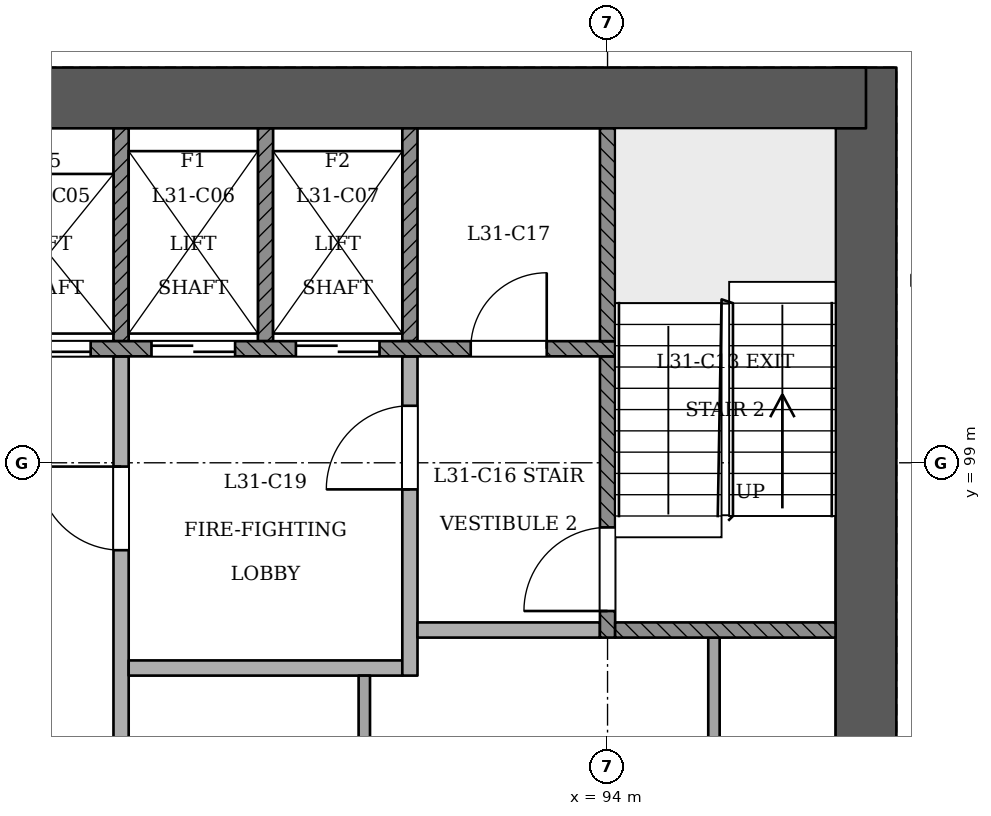
"""IFC4 building model, lengths in metres.
Left out: names, types, materials, properties, quantities, classifications, styles, units other than length and angle.
Written with IfcOpenShell. Run it as: python <this file> out.ifc"""

import sys

from ifc_helpers import new_model, si_unit, direction, frame, frame_2d, origin, place, context, subcontext, project, spatial, rectangle, extrude, element, fill, save


model = new_model("IFC4")
c1 = context("Model", 3, precision=1e-05, world=origin(), true_north=direction((0.0, 1.0)))
c2 = subcontext(c1, "Body", "Model", "MODEL_VIEW")
j1 = project(units=[si_unit("LENGTHUNIT", "METRE"), si_unit("PLANEANGLEUNIT", "RADIAN")], contexts=[c1])
p1 = place(None, origin())
s1 = spatial("IfcSite", under=j1, at=p1, CompositionType="ELEMENT")
p2 = place(p1, origin())
s2 = spatial("IfcBuilding", under=s1, at=p2, CompositionType="ELEMENT")
p3 = place(p2, frame((0.0, 0.0, 124.2)))
s3 = spatial("IfcBuildingStorey", under=s2, at=p3, CompositionType="ELEMENT", Elevation=124.2)
p4 = place(p3, frame((97.4, 93.0, 0.0), z_axis=(0.0, 0.0, 1.0), x_axis=(0.0, 1.0, 0.0)))
e1 = element("IfcWall", 1, at=p4, inside=s3, PredefinedType="SHEAR", context=c2, shape_type="SweptSolid", body=[
    extrude(rectangle(XDim=11.2, YDim=0.8, at=frame_2d((5.6, 0.0))), origin(), (0.0, 0.0, 1.0), 3.6),
])
p5 = place(p3, frame((97.4, 103.8, 0.0), z_axis=(0.0, 0.0, 1.0), x_axis=(-1.0, 0.0, 0.0)))
e2 = element("IfcWall", 2, at=p5, inside=s3, PredefinedType="SHEAR", context=c2, shape_type="SweptSolid", body=[
    extrude(rectangle(XDim=25.2, YDim=0.8, at=frame_2d((12.6, 0.0))), origin(), (0.0, 0.0, 1.0), 3.6),
])
p6 = place(p3, frame((85.208, 62.842, 0.0), z_axis=(0.0, 0.0, 1.0), x_axis=(0.499999338616, 0.866025785634, 0.0)))
e3 = element("IfcWall", 3, at=p6, inside=s3, PredefinedType="PARTITIONING", context=c2, shape_type="SweptSolid", body=[
    extrude(rectangle(XDim=40.758, YDim=0.15, at=frame_2d((20.379, 0.0))), origin(), (0.0, 0.0, 1.0), 2.75),
])
p7 = place(p6, frame((0.295, 0.0, 0.0)))
e4 = element("IfcOpeningElement", 4, at=p7, cuts=e3, PredefinedType="OPENING", context=c2, shape_type="SweptSolid", body=[
    extrude(rectangle(XDim=1.2, YDim=2.1, at=frame_2d((0.6, 1.05))), frame((0.0, 0.085, 0.0), z_axis=(0.0, -1.0, 0.0), x_axis=(1.0, 0.0, 0.0)), (0.0, 0.0, 1.0), 0.171),
])
p8 = place(p6, frame((4.129, 0.0, 0.0)))
e5 = element("IfcOpeningElement", 5, at=p8, cuts=e3, PredefinedType="OPENING", context=c2, shape_type="SweptSolid", body=[
    extrude(rectangle(XDim=1.0, YDim=2.1, at=frame_2d((0.5, 1.05))), frame((0.0, 0.085, 0.0), z_axis=(0.0, -1.0, 0.0), x_axis=(1.0, 0.0, 0.0)), (0.0, 0.0, 1.0), 0.171),
])
p9 = place(p6, frame((9.659, 0.0, 0.0)))
e6 = element("IfcOpeningElement", 6, at=p9, cuts=e3, PredefinedType="OPENING", context=c2, shape_type="SweptSolid", body=[
    extrude(rectangle(XDim=1.0, YDim=2.1, at=frame_2d((0.5, 1.05))), frame((0.0, 0.085, 0.0), z_axis=(0.0, -1.0, 0.0), x_axis=(1.0, 0.0, 0.0)), (0.0, 0.0, 1.0), 0.171),
])
p10 = place(p6, frame((11.984, 0.0, 0.0)))
e7 = element("IfcOpeningElement", 7, at=p10, cuts=e3, PredefinedType="OPENING", context=c2, shape_type="SweptSolid", body=[
    extrude(rectangle(XDim=1.0, YDim=2.1, at=frame_2d((0.5, 1.05))), frame((0.0, 0.085, 0.0), z_axis=(0.0, -1.0, 0.0), x_axis=(1.0, 0.0, 0.0)), (0.0, 0.0, 1.0), 0.171),
])
p11 = place(p6, frame((18.774, 0.0, 0.0)))
e8 = element("IfcOpeningElement", 8, at=p11, cuts=e3, PredefinedType="OPENING", context=c2, shape_type="SweptSolid", body=[
    extrude(rectangle(XDim=1.0, YDim=2.1, at=frame_2d((0.5, 1.05))), frame((0.0, 0.085, 0.0), z_axis=(0.0, -1.0, 0.0), x_axis=(1.0, 0.0, 0.0)), (0.0, 0.0, 1.0), 0.171),
])
p12 = place(p6, frame((21.099, 0.0, 0.0)))
e9 = element("IfcOpeningElement", 9, at=p12, cuts=e3, PredefinedType="OPENING", context=c2, shape_type="SweptSolid", body=[
    extrude(rectangle(XDim=1.0, YDim=2.1, at=frame_2d((0.5, 1.05))), frame((0.0, 0.085, 0.0), z_axis=(0.0, -1.0, 0.0), x_axis=(1.0, 0.0, 0.0)), (0.0, 0.0, 1.0), 0.171),
])
p13 = place(p6, frame((27.659, 0.0, 0.0)))
e10 = element("IfcOpeningElement", 10, at=p13, cuts=e3, PredefinedType="OPENING", context=c2, shape_type="SweptSolid", body=[
    extrude(rectangle(XDim=1.0, YDim=2.1, at=frame_2d((0.5, 1.05))), frame((0.0, 0.085, 0.0), z_axis=(0.0, -1.0, 0.0), x_axis=(1.0, 0.0, 0.0)), (0.0, 0.0, 1.0), 0.171),
])
p14 = place(p6, frame((30.099, 0.0, 0.0)))
e11 = element("IfcOpeningElement", 11, at=p14, cuts=e3, PredefinedType="OPENING", context=c2, shape_type="SweptSolid", body=[
    extrude(rectangle(XDim=1.0, YDim=2.1, at=frame_2d((0.5, 1.05))), frame((0.0, 0.085, 0.0), z_axis=(0.0, -1.0, 0.0), x_axis=(1.0, 0.0, 0.0)), (0.0, 0.0, 1.0), 0.171),
])
p15 = place(p6, frame((39.358, 0.0, 0.0)))
e12 = element("IfcOpeningElement", 12, at=p15, cuts=e3, PredefinedType="OPENING", context=c2, shape_type="SweptSolid", body=[
    extrude(rectangle(XDim=1.2, YDim=2.1, at=frame_2d((0.6, 1.05))), frame((0.0, 0.085, 0.0), z_axis=(0.0, -1.0, 0.0), x_axis=(1.0, 0.0, 0.0)), (0.0, 0.0, 1.0), 0.171),
])
p16 = place(p3, frame((87.6, 93.4, 0.0), z_axis=(0.0, 0.0, 1.0), x_axis=(0.0, 1.0, 0.0)))
e13 = element("IfcWall", 13, at=p16, inside=s3, PredefinedType="PARTITIONING", context=c2, shape_type="SweptSolid", body=[
    extrude(rectangle(XDim=7.0, YDim=0.2, at=frame_2d((3.5, 0.0))), origin(), (0.0, 0.0, 1.0), 3.15),
])
p17 = place(p16, frame((4.45, 0.0, 0.0)))
e14 = element("IfcOpeningElement", 14, at=p17, cuts=e13, PredefinedType="OPENING", context=c2, shape_type="SweptSolid", body=[
    extrude(rectangle(XDim=1.1, YDim=2.1, at=frame_2d((0.55, 1.05))), frame((0.0, 0.11, 0.0), z_axis=(0.0, -1.0, 0.0), x_axis=(1.0, 0.0, 0.0)), (0.0, 0.0, 1.0), 0.221),
])
p18 = place(p3, frame((90.8, 93.4, 0.0), z_axis=(0.0, 0.0, 1.0), x_axis=(0.0, 1.0, 0.0)))
e15 = element("IfcWall", 15, at=p18, inside=s3, PredefinedType="PARTITIONING", context=c2, shape_type="SweptSolid", body=[
    extrude(rectangle(XDim=2.8, YDim=0.15, at=frame_2d((1.4, 0.0))), origin(), (0.0, 0.0, 1.0), 3.15),
])
p19 = place(p3, frame((95.4, 93.4, 0.0), z_axis=(0.0, 0.0, 1.0), x_axis=(0.0, 1.0, 0.0)))
e16 = element("IfcWall", 16, at=p19, inside=s3, PredefinedType="PARTITIONING", context=c2, shape_type="SweptSolid", body=[
    extrude(rectangle(XDim=3.3, YDim=0.15, at=frame_2d((1.65, 0.0))), origin(), (0.0, 0.0, 1.0), 3.15),
])
p20 = place(p3, frame((87.7, 96.3, 0.0), z_axis=(0.0, 0.0, 1.0), x_axis=(1.0, 0.0, 0.0)))
e17 = element("IfcWall", 17, at=p20, inside=s3, PredefinedType="PARTITIONING", context=c2, shape_type="SweptSolid", body=[
    extrude(rectangle(XDim=3.6, YDim=0.2, at=frame_2d((1.8, 0.0))), origin(), (0.0, 0.0, 1.0), 3.15),
])
p21 = place(p3, frame((91.4, 96.2, 0.0), z_axis=(0.0, 0.0, 1.0), x_axis=(0.0, 1.0, 0.0)))
e18 = element("IfcWall", 18, at=p21, inside=s3, PredefinedType="PARTITIONING", context=c2, shape_type="SweptSolid", body=[
    extrude(rectangle(XDim=4.2, YDim=0.2, at=frame_2d((2.1, 0.0))), origin(), (0.0, 0.0, 1.0), 3.15),
])
p22 = place(p21, frame((2.45, 0.0, 0.0)))
e19 = element("IfcOpeningElement", 19, at=p22, cuts=e18, PredefinedType="OPENING", context=c2, shape_type="SweptSolid", body=[
    extrude(rectangle(XDim=1.1, YDim=2.1, at=frame_2d((0.55, 1.05))), frame((0.0, 0.11, 0.0), z_axis=(0.0, -1.0, 0.0), x_axis=(1.0, 0.0, 0.0)), (0.0, 0.0, 1.0), 0.221),
])
p23 = place(p3, frame((91.5, 96.8, 0.0), z_axis=(0.0, 0.0, 1.0), x_axis=(1.0, 0.0, 0.0)))
e20 = element("IfcWall", 20, at=p23, inside=s3, PredefinedType="PARTITIONING", context=c2, shape_type="SweptSolid", body=[
    extrude(rectangle(XDim=2.4, YDim=0.2, at=frame_2d((1.2, 0.0))), origin(), (0.0, 0.0, 1.0), 3.15),
])
p24 = place(p3, frame((94.0, 96.7, 0.0), z_axis=(0.0, 0.0, 1.0), x_axis=(0.0, 1.0, 0.0)))
e21 = element("IfcWall", 21, at=p24, inside=s3, PredefinedType="SOLIDWALL", context=c2, shape_type="SweptSolid", body=[
    extrude(rectangle(XDim=3.7, YDim=0.2, at=frame_2d((1.85, 0.0))), origin(), (0.0, 0.0, 1.0), 3.15),
])
p25 = place(p24, frame((0.35, 0.0, 0.0)))
e22 = element("IfcOpeningElement", 22, at=p25, cuts=e21, PredefinedType="OPENING", context=c2, shape_type="SweptSolid", body=[
    extrude(rectangle(XDim=1.1, YDim=2.1, at=frame_2d((0.55, 1.05))), frame((0.0, 0.11, 0.0), z_axis=(0.0, -1.0, 0.0), x_axis=(1.0, 0.0, 0.0)), (0.0, 0.0, 1.0), 0.221),
])
p26 = place(p3, frame((94.1, 96.8, 0.0), z_axis=(0.0, 0.0, 1.0), x_axis=(1.0, 0.0, 0.0)))
e23 = element("IfcWall", 23, at=p26, inside=s3, PredefinedType="SOLIDWALL", context=c2, shape_type="SweptSolid", body=[
    extrude(rectangle(XDim=2.9, YDim=0.2, at=frame_2d((1.45, 0.0))), origin(), (0.0, 0.0, 1.0), 3.15),
])
p27 = place(p3, frame((75.9, 100.5, 0.0), z_axis=(0.0, 0.0, 1.0), x_axis=(1.0, 0.0, 0.0)))
e24 = element("IfcWall", 24, at=p27, inside=s3, PredefinedType="SOLIDWALL", context=c2, shape_type="SweptSolid", body=[
    extrude(rectangle(XDim=18.2, YDim=0.2, at=frame_2d((9.1, 0.0))), origin(), (0.0, 0.0, 1.0), 3.15),
])
p28 = place(p27, frame((2.6, 0.0, 0.0)))
e25 = element("IfcOpeningElement", 25, at=p28, cuts=e24, PredefinedType="OPENING", context=c2, shape_type="SweptSolid", body=[
    extrude(rectangle(XDim=1.1, YDim=2.1, at=frame_2d((0.55, 1.05))), frame((0.0, 0.11, 0.0), z_axis=(0.0, -1.0, 0.0), x_axis=(1.0, 0.0, 0.0)), (0.0, 0.0, 1.0), 0.221),
])
p29 = place(p27, frame((4.5, 0.0, 0.0)))
e26 = element("IfcOpeningElement", 26, at=p29, cuts=e24, PredefinedType="OPENING", context=c2, shape_type="SweptSolid", body=[
    extrude(rectangle(XDim=1.1, YDim=2.1, at=frame_2d((0.55, 1.05))), frame((0.0, 0.11, 0.0), z_axis=(0.0, -1.0, 0.0), x_axis=(1.0, 0.0, 0.0)), (0.0, 0.0, 1.0), 0.221),
])
p30 = place(p27, frame((6.4, 0.0, 0.0)))
e27 = element("IfcOpeningElement", 27, at=p30, cuts=e24, PredefinedType="OPENING", context=c2, shape_type="SweptSolid", body=[
    extrude(rectangle(XDim=1.1, YDim=2.1, at=frame_2d((0.55, 1.05))), frame((0.0, 0.11, 0.0), z_axis=(0.0, -1.0, 0.0), x_axis=(1.0, 0.0, 0.0)), (0.0, 0.0, 1.0), 0.221),
])
p31 = place(p27, frame((8.3, 0.0, 0.0)))
e28 = element("IfcOpeningElement", 28, at=p31, cuts=e24, PredefinedType="OPENING", context=c2, shape_type="SweptSolid", body=[
    extrude(rectangle(XDim=1.1, YDim=2.1, at=frame_2d((0.55, 1.05))), frame((0.0, 0.11, 0.0), z_axis=(0.0, -1.0, 0.0), x_axis=(1.0, 0.0, 0.0)), (0.0, 0.0, 1.0), 0.221),
])
p32 = place(p27, frame((10.2, 0.0, 0.0)))
e29 = element("IfcOpeningElement", 29, at=p32, cuts=e24, PredefinedType="OPENING", context=c2, shape_type="SweptSolid", body=[
    extrude(rectangle(XDim=1.1, YDim=2.1, at=frame_2d((0.55, 1.05))), frame((0.0, 0.11, 0.0), z_axis=(0.0, -1.0, 0.0), x_axis=(1.0, 0.0, 0.0)), (0.0, 0.0, 1.0), 0.221),
])
p33 = place(p27, frame((12.1, 0.0, 0.0)))
e30 = element("IfcOpeningElement", 30, at=p33, cuts=e24, PredefinedType="OPENING", context=c2, shape_type="SweptSolid", body=[
    extrude(rectangle(XDim=1.1, YDim=2.1, at=frame_2d((0.55, 1.05))), frame((0.0, 0.11, 0.0), z_axis=(0.0, -1.0, 0.0), x_axis=(1.0, 0.0, 0.0)), (0.0, 0.0, 1.0), 0.221),
])
p34 = place(p27, frame((14.0, 0.0, 0.0)))
e31 = element("IfcOpeningElement", 31, at=p34, cuts=e24, PredefinedType="OPENING", context=c2, shape_type="SweptSolid", body=[
    extrude(rectangle(XDim=1.1, YDim=2.1, at=frame_2d((0.55, 1.05))), frame((0.0, 0.11, 0.0), z_axis=(0.0, -1.0, 0.0), x_axis=(1.0, 0.0, 0.0)), (0.0, 0.0, 1.0), 0.221),
])
p35 = place(p27, frame((0.65, 0.0, 0.0)))
e32 = element("IfcOpeningElement", 32, at=p35, cuts=e24, PredefinedType="OPENING", context=c2, shape_type="SweptSolid", body=[
    extrude(rectangle(XDim=1.0, YDim=2.1, at=frame_2d((0.5, 1.05))), frame((0.0, 0.11, 0.0), z_axis=(0.0, -1.0, 0.0), x_axis=(1.0, 0.0, 0.0)), (0.0, 0.0, 1.0), 0.221),
])
p36 = place(p27, frame((16.3, 0.0, 0.0)))
e33 = element("IfcOpeningElement", 33, at=p36, cuts=e24, PredefinedType="OPENING", context=c2, shape_type="SweptSolid", body=[
    extrude(rectangle(XDim=1.0, YDim=2.1, at=frame_2d((0.5, 1.05))), frame((0.0, 0.11, 0.0), z_axis=(0.0, -1.0, 0.0), x_axis=(1.0, 0.0, 0.0)), (0.0, 0.0, 1.0), 0.221),
])
for number, where, z_axis, x_axis in (
    (34, (87.6, 100.6, 0.0), (0.0, 0.0, 1.0), (0.0, 1.0, 0.0)),
    (35, (89.5, 100.6, 0.0), (0.0, 0.0, 1.0), (0.0, 1.0, 0.0)),
    (36, (91.4, 100.6, 0.0), (0.0, 0.0, 1.0), (0.0, 1.0, 0.0)),
    (37, (94.0, 100.6, 0.0), (0.0, 0.0, 1.0), (0.0, 1.0, 0.0)),
):
    element("IfcWall", number, at=place(p3, frame(where, z_axis=z_axis, x_axis=x_axis)), inside=s3, PredefinedType="SOLIDWALL", context=c2, shape_type="SweptSolid", body=[
        extrude(rectangle(XDim=2.8, YDim=0.2, at=frame_2d((1.4, 0.0))), origin(), (0.0, 0.0, 1.0), 3.15),
    ])
p37 = place(p32, origin())
e38 = element("IfcDoor", 38, at=p37, inside=s3, OperationType="SLIDING_TO_RIGHT", PredefinedType="NOTDEFINED", context=c2, shape_type="SweptSolid", body=[
    extrude(rectangle(XDim=1.1, YDim=2.1, at=frame_2d((0.55, 1.05))), frame((0.0, 0.025, 0.0), z_axis=(0.0, -1.0, 0.0), x_axis=(1.0, 0.0, 0.0)), (0.0, 0.0, 1.0), 0.05),
])
fill(e29, e38)
p38 = place(p33, origin())
e39 = element("IfcDoor", 39, at=p38, inside=s3, OperationType="SLIDING_TO_RIGHT", PredefinedType="NOTDEFINED", context=c2, shape_type="SweptSolid", body=[
    extrude(rectangle(XDim=1.1, YDim=2.1, at=frame_2d((0.55, 1.05))), frame((0.0, 0.025, 0.0), z_axis=(0.0, -1.0, 0.0), x_axis=(1.0, 0.0, 0.0)), (0.0, 0.0, 1.0), 0.05),
])
fill(e30, e39)
p39 = place(p34, origin())
e40 = element("IfcDoor", 40, at=p39, inside=s3, OperationType="SLIDING_TO_LEFT", PredefinedType="NOTDEFINED", context=c2, shape_type="SweptSolid", body=[
    extrude(rectangle(XDim=1.1, YDim=2.1, at=frame_2d((0.55, 1.05))), frame((0.0, 0.025, 0.0), z_axis=(0.0, -1.0, 0.0), x_axis=(1.0, 0.0, 0.0)), (0.0, 0.0, 1.0), 0.05),
])
fill(e31, e40)
p40 = place(p25, origin())
e41 = element("IfcDoor", 41, at=p40, inside=s3, OperationType="SINGLE_SWING_LEFT", PredefinedType="NOTDEFINED", context=c2, shape_type="SweptSolid", body=[
    extrude(rectangle(XDim=1.1, YDim=2.1, at=frame_2d((0.55, 1.05))), frame((0.0, 0.025, 0.0), z_axis=(0.0, -1.0, 0.0), x_axis=(1.0, 0.0, 0.0)), (0.0, 0.0, 1.0), 0.05),
])
fill(e22, e41)
p41 = place(p17, origin())
e42 = element("IfcDoor", 42, at=p41, inside=s3, OperationType="SINGLE_SWING_RIGHT", PredefinedType="NOTDEFINED", context=c2, shape_type="SweptSolid", body=[
    extrude(rectangle(XDim=1.1, YDim=2.1, at=frame_2d((0.55, 1.05))), frame((0.0, 0.025, 0.0), z_axis=(0.0, -1.0, 0.0), x_axis=(1.0, 0.0, 0.0)), (0.0, 0.0, 1.0), 0.05),
])
fill(e14, e42)
p42 = place(p22, origin())
e43 = element("IfcDoor", 43, at=p42, inside=s3, OperationType="SINGLE_SWING_LEFT", PredefinedType="NOTDEFINED", context=c2, shape_type="SweptSolid", body=[
    extrude(rectangle(XDim=1.1, YDim=2.1, at=frame_2d((0.55, 1.05))), frame((0.0, 0.025, 0.0), z_axis=(0.0, -1.0, 0.0), x_axis=(1.0, 0.0, 0.0)), (0.0, 0.0, 1.0), 0.05),
])
fill(e19, e43)
p43 = place(p36, origin())
e44 = element("IfcDoor", 44, at=p43, inside=s3, OperationType="SINGLE_SWING_RIGHT", PredefinedType="NOTDEFINED", context=c2, shape_type="SweptSolid", body=[
    extrude(rectangle(XDim=1.0, YDim=2.1, at=frame_2d((0.5, 1.05))), frame((0.0, 0.025, 0.0), z_axis=(0.0, -1.0, 0.0), x_axis=(1.0, 0.0, 0.0)), (0.0, 0.0, 1.0), 0.05),
])
fill(e33, e44)
save(model, sys.argv[1])
